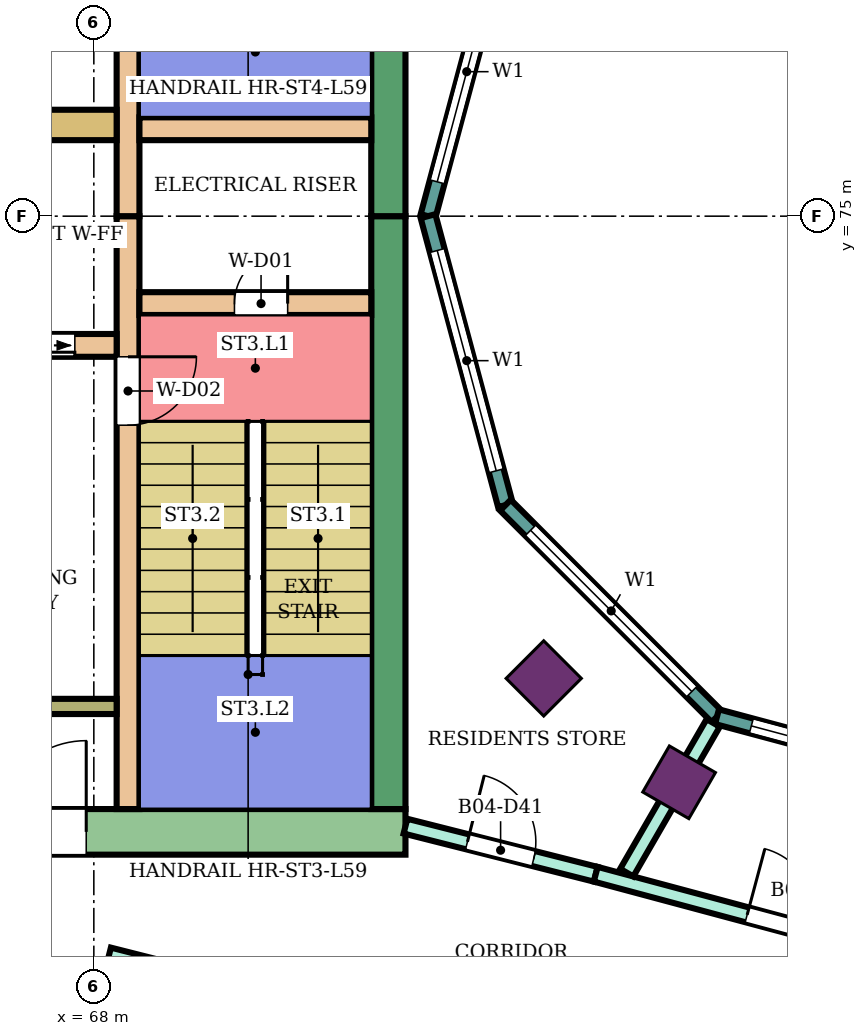
"""IFC4 building model, lengths in metres.
Left out: names, types, materials, properties, quantities, classifications, styles, units other than length and angle.
Written with IfcOpenShell. Run it as: python <this file> out.ifc"""

import sys

from ifc_helpers import new_model, si_unit, direction, frame, frame_2d, origin, origin_2d, place, context, subcontext, project, spatial, rectangle, extrude, element, fill, save


model = new_model("IFC4")
c1 = context("Model", 3, precision=1e-05, world=origin(), true_north=direction((0.0, 1.0)))
c2 = subcontext(c1, "Body", "Model", "MODEL_VIEW")
j1 = project(units=[si_unit("LENGTHUNIT", "METRE"), si_unit("PLANEANGLEUNIT", "RADIAN")], contexts=[c1])
p1 = place(None, origin())
s1 = spatial("IfcSite", under=j1, at=p1, CompositionType="ELEMENT")
p2 = place(p1, origin())
s2 = spatial("IfcBuilding", under=s1, at=p2, CompositionType="ELEMENT")
p3 = place(p2, frame((0.0, 0.0, 258.3)))
s3 = spatial("IfcBuildingStorey", under=s2, at=p3, CompositionType="ELEMENT", Elevation=258.3)
for number, where, z_axis, x_axis in (
    (1, (73.919, 68.919, 0.0), (0.0, 0.0, 1.0), (-0.707, -0.707, 0.0)),
    (2, (75.7, 67.552, 0.0), (0.0, 0.0, 1.0), (-0.5, -0.866, 0.0)),
):
    element("IfcColumn", number, at=place(p3, frame(where, z_axis=z_axis, x_axis=x_axis)), inside=s3, PredefinedType="COLUMN", context=c2, shape_type="SweptSolid", body=[
        extrude(rectangle(XDim=0.7, YDim=0.7, at=origin_2d()), origin(), (0.0, 0.0, 1.0), 4.2),
    ])
p4 = place(p3, frame((72.1, 66.9, 0.0), z_axis=(0.0, 0.0, 1.0), x_axis=(-1.0, 0.0, 0.0)))
e3 = element("IfcWall", 3, at=p4, inside=s3, PredefinedType="SHEAR", context=c2, shape_type="SweptSolid", body=[
    extrude(rectangle(XDim=14.9, YDim=0.6, at=frame_2d((7.45, 0.0))), origin(), (0.0, 0.0, 1.0), 3.88),
])
p5 = place(p4, frame((4.2, 0.0, 0.0)))
e4 = element("IfcOpeningElement", 4, at=p5, cuts=e3, PredefinedType="OPENING", context=c2, shape_type="SweptSolid", body=[
    extrude(rectangle(XDim=2.4, YDim=2.4, at=frame_2d((1.2, 1.2))), frame((0.0, 0.31, 0.0), z_axis=(0.0, -1.0, 0.0), x_axis=(1.0, 0.0, 0.0)), (0.0, 0.0, 1.0), 0.62),
])
for number, where, z_axis, x_axis in (
    (5, (71.875, 75.0, 0.0), (0.0, 0.0, 1.0), (0.0, -1.0, 0.0)),
    (6, (71.875, 82.8, 0.0), (0.0, 0.0, 1.0), (0.0, -1.0, 0.0)),
):
    element("IfcWall", number, at=place(p3, frame(where, z_axis=z_axis, x_axis=x_axis)), inside=s3, PredefinedType="SHEAR", context=c2, shape_type="SweptSolid", body=[
        extrude(rectangle(XDim=7.8, YDim=0.45, at=frame_2d((3.9, 0.0))), origin(), (0.0, 0.0, 1.0), 3.88),
    ])
p6 = place(p3, frame((68.45, 75.0, 0.0), z_axis=(0.0, 0.0, 1.0), x_axis=(0.0, -1.0, 0.0)))
e7 = element("IfcWall", 7, at=p6, inside=s3, PredefinedType="SHEAR", context=c2, shape_type="SweptSolid", body=[
    extrude(rectangle(XDim=7.8, YDim=0.3, at=frame_2d((3.9, 0.0))), origin(), (0.0, 0.0, 1.0), 3.88),
])
p7 = place(p6, frame((1.85, 0.0, 0.0)))
e8 = element("IfcOpeningElement", 8, at=p7, cuts=e7, PredefinedType="OPENING", context=c2, shape_type="SweptSolid", body=[
    extrude(rectangle(XDim=0.9, YDim=2.1, at=frame_2d((0.45, 1.05))), frame((0.0, 0.16, 0.0), z_axis=(0.0, -1.0, 0.0), x_axis=(1.0, 0.0, 0.0)), (0.0, 0.0, 1.0), 0.32),
])
p8 = place(p3, frame((68.45, 82.8, 0.0), z_axis=(0.0, 0.0, 1.0), x_axis=(0.0, -1.0, 0.0)))
e9 = element("IfcWall", 9, at=p8, inside=s3, PredefinedType="SHEAR", context=c2, shape_type="SweptSolid", body=[
    extrude(rectangle(XDim=7.8, YDim=0.3, at=frame_2d((3.9, 0.0))), origin(), (0.0, 0.0, 1.0), 3.88),
])
p9 = place(p8, frame((0.45, 0.0, 0.0)))
e10 = element("IfcOpeningElement", 10, at=p9, cuts=e9, PredefinedType="OPENING", context=c2, shape_type="SweptSolid", body=[
    extrude(rectangle(XDim=0.9, YDim=2.1, at=frame_2d((0.45, 1.05))), frame((0.0, 0.16, 0.0), z_axis=(0.0, -1.0, 0.0), x_axis=(1.0, 0.0, 0.0)), (0.0, 0.0, 1.0), 0.32),
])
p10 = place(p3, frame((71.65, 73.85, 0.0), z_axis=(0.0, 0.0, 1.0), x_axis=(-1.0, 0.0, 0.0)))
e11 = element("IfcWall", 11, at=p10, inside=s3, PredefinedType="SHEAR", context=c2, shape_type="SweptSolid", body=[
    extrude(rectangle(XDim=3.05, YDim=0.3, at=frame_2d((1.525, 0.0))), origin(), (0.0, 0.0, 1.0), 3.88),
])
p11 = place(p10, frame((1.1, 0.0, 0.0)))
e12 = element("IfcOpeningElement", 12, at=p11, cuts=e11, PredefinedType="OPENING", context=c2, shape_type="SweptSolid", body=[
    extrude(rectangle(XDim=0.7, YDim=2.0, at=frame_2d((0.35, 1.0))), frame((0.0, 0.16, 0.0), z_axis=(0.0, -1.0, 0.0), x_axis=(1.0, 0.0, 0.0)), (0.0, 0.0, 1.0), 0.32),
])
p12 = place(p3, frame((71.65, 76.15, 0.0), z_axis=(0.0, 0.0, 1.0), x_axis=(-1.0, 0.0, 0.0)))
e13 = element("IfcWall", 13, at=p12, inside=s3, PredefinedType="SHEAR", context=c2, shape_type="SweptSolid", body=[
    extrude(rectangle(XDim=3.05, YDim=0.3, at=frame_2d((1.525, 0.0))), origin(), (0.0, 0.0, 1.0), 3.88),
])
p13 = place(p3, frame((68.3, 73.3, 0.0), z_axis=(0.0, 0.0, 1.0), x_axis=(-1.0, 0.0, 0.0)))
e14 = element("IfcWall", 14, at=p13, inside=s3, PredefinedType="SHEAR", context=c2, shape_type="SweptSolid", body=[
    extrude(rectangle(XDim=11.1, YDim=0.3, at=frame_2d((5.55, 0.0))), origin(), (0.0, 0.0, 1.0), 3.88),
])
p14 = place(p13, frame((0.55, 0.0, 0.0)))
e15 = element("IfcOpeningElement", 15, at=p14, cuts=e14, PredefinedType="OPENING", context=c2, shape_type="SweptSolid", body=[
    extrude(rectangle(XDim=1.1, YDim=2.1, at=frame_2d((0.55, 1.05))), frame((0.0, 0.16, 0.0), z_axis=(0.0, -1.0, 0.0), x_axis=(1.0, 0.0, 0.0)), (0.0, 0.0, 1.0), 0.32),
])
p15 = place(p13, frame((3.0, 0.0, 0.0)))
e16 = element("IfcOpeningElement", 16, at=p15, cuts=e14, PredefinedType="OPENING", context=c2, shape_type="SweptSolid", body=[
    extrude(rectangle(XDim=1.2, YDim=2.1, at=frame_2d((0.6, 1.05))), frame((0.0, 0.16, 0.0), z_axis=(0.0, -1.0, 0.0), x_axis=(1.0, 0.0, 0.0)), (0.0, 0.0, 1.0), 0.32),
])
p16 = place(p13, frame((5.5, 0.0, 0.0)))
e17 = element("IfcOpeningElement", 17, at=p16, cuts=e14, PredefinedType="OPENING", context=c2, shape_type="SweptSolid", body=[
    extrude(rectangle(XDim=1.2, YDim=2.1, at=frame_2d((0.6, 1.05))), frame((0.0, 0.16, 0.0), z_axis=(0.0, -1.0, 0.0), x_axis=(1.0, 0.0, 0.0)), (0.0, 0.0, 1.0), 0.32),
])
p17 = place(p13, frame((7.77, 0.0, 0.0)))
e18 = element("IfcOpeningElement", 18, at=p17, cuts=e14, PredefinedType="OPENING", context=c2, shape_type="SweptSolid", body=[
    extrude(rectangle(XDim=0.9, YDim=2.1, at=frame_2d((0.45, 1.05))), frame((0.0, 0.16, 0.0), z_axis=(0.0, -1.0, 0.0), x_axis=(1.0, 0.0, 0.0)), (0.0, 0.0, 1.0), 0.32),
])
p18 = place(p13, frame((9.57, 0.0, 0.0)))
e19 = element("IfcOpeningElement", 19, at=p18, cuts=e14, PredefinedType="OPENING", context=c2, shape_type="SweptSolid", body=[
    extrude(rectangle(XDim=0.9, YDim=2.1, at=frame_2d((0.45, 1.05))), frame((0.0, 0.16, 0.0), z_axis=(0.0, -1.0, 0.0), x_axis=(1.0, 0.0, 0.0)), (0.0, 0.0, 1.0), 0.32),
])
p19 = place(p3, frame((68.3, 76.2, 0.0), z_axis=(0.0, 0.0, 1.0), x_axis=(-1.0, 0.0, 0.0)))
e20 = element("IfcWall", 20, at=p19, inside=s3, PredefinedType="SHEAR", context=c2, shape_type="SweptSolid", body=[
    extrude(rectangle(XDim=11.1, YDim=0.4, at=frame_2d((5.55, 0.0))), origin(), (0.0, 0.0, 1.0), 3.88),
])
p20 = place(p3, frame((68.3, 68.55, 0.0), z_axis=(0.0, 0.0, 1.0), x_axis=(-1.0, 0.0, 0.0)))
e21 = element("IfcWall", 21, at=p20, inside=s3, PredefinedType="SHEAR", context=c2, shape_type="SweptSolid", body=[
    extrude(rectangle(XDim=4.35, YDim=0.2, at=frame_2d((2.175, 0.0))), origin(), (0.0, 0.0, 1.0), 3.88),
])
p21 = place(p3, frame((73.415, 78.802, 0.0), z_axis=(0.0, 0.0, 1.0), x_axis=(-0.258789828301, -0.965933654434, 0.0)))
e22 = element("IfcWall", 22, at=p21, inside=s3, PredefinedType="NOTDEFINED", context=c2, shape_type="SweptSolid", body=[
    extrude(rectangle(XDim=3.936, YDim=0.2, at=frame_2d((1.968, 0.0))), origin(), (0.0, 0.0, 1.0), 4.2),
])
p22 = place(p21, frame((0.468, 0.0, 0.9)))
e23 = element("IfcOpeningElement", 23, at=p22, cuts=e22, PredefinedType="OPENING", context=c2, shape_type="SweptSolid", body=[
    extrude(rectangle(XDim=3.0, YDim=2.3, at=frame_2d((1.5, 1.15))), frame((0.0, 0.11, 0.0), z_axis=(0.0, -1.0, 0.0), x_axis=(1.0, 0.0, 0.0)), (0.0, 0.0, 1.0), 0.22),
])
p23 = place(p3, frame((72.396, 75.0, 0.0), z_axis=(0.0, 0.0, 1.0), x_axis=(0.258789828301, -0.965933654434, 0.0)))
e24 = element("IfcWall", 24, at=p23, inside=s3, PredefinedType="NOTDEFINED", context=c2, shape_type="SweptSolid", body=[
    extrude(rectangle(XDim=3.936, YDim=0.2, at=frame_2d((1.968, 0.0))), origin(), (0.0, 0.0, 1.0), 4.2),
])
p24 = place(p23, frame((0.468, 0.0, 0.9)))
e25 = element("IfcOpeningElement", 25, at=p24, cuts=e24, PredefinedType="OPENING", context=c2, shape_type="SweptSolid", body=[
    extrude(rectangle(XDim=3.0, YDim=2.3, at=frame_2d((1.5, 1.15))), frame((0.0, 0.11, 0.0), z_axis=(0.0, -1.0, 0.0), x_axis=(1.0, 0.0, 0.0)), (0.0, 0.0, 1.0), 0.22),
])
p25 = place(p3, frame((73.415, 71.198, 0.0), z_axis=(0.0, 0.0, 1.0), x_axis=(0.707106781187, -0.707106781187, 0.0)))
e26 = element("IfcWall", 26, at=p25, inside=s3, PredefinedType="NOTDEFINED", context=c2, shape_type="SweptSolid", body=[
    extrude(rectangle(XDim=3.936, YDim=0.2, at=frame_2d((1.968, 0.0))), origin(), (0.0, 0.0, 1.0), 4.2),
])
p26 = place(p25, frame((0.468, 0.0, 0.9)))
e27 = element("IfcOpeningElement", 27, at=p26, cuts=e26, PredefinedType="OPENING", context=c2, shape_type="SweptSolid", body=[
    extrude(rectangle(XDim=3.0, YDim=2.3, at=frame_2d((1.5, 1.15))), frame((0.0, 0.11, 0.0), z_axis=(0.0, -1.0, 0.0), x_axis=(1.0, 0.0, 0.0)), (0.0, 0.0, 1.0), 0.22),
])
p27 = place(p3, frame((76.198, 68.415, 0.0), z_axis=(0.0, 0.0, 1.0), x_axis=(0.965933654434, -0.258789828301, 0.0)))
e28 = element("IfcWall", 28, at=p27, inside=s3, PredefinedType="NOTDEFINED", context=c2, shape_type="SweptSolid", body=[
    extrude(rectangle(XDim=3.936, YDim=0.2, at=frame_2d((1.968, 0.0))), origin(), (0.0, 0.0, 1.0), 4.2),
])
p28 = place(p27, frame((0.468, 0.0, 0.9)))
e29 = element("IfcOpeningElement", 29, at=p28, cuts=e28, PredefinedType="OPENING", context=c2, shape_type="SweptSolid", body=[
    extrude(rectangle(XDim=3.0, YDim=2.3, at=frame_2d((1.5, 1.15))), frame((0.0, 0.11, 0.0), z_axis=(0.0, -1.0, 0.0), x_axis=(1.0, 0.0, 0.0)), (0.0, 0.0, 1.0), 0.22),
])
p29 = place(p3, frame((68.2, 65.28, 0.0), z_axis=(0.0, 0.0, 1.0), x_axis=(0.969450596516, -0.245286650503, 0.0)))
e30 = element("IfcWall", 30, at=p29, inside=s3, PredefinedType="PARTITIONING", context=c2, shape_type="SweptSolid", body=[
    extrude(rectangle(XDim=5.928, YDim=0.2, at=frame_2d((2.964, 0.0))), origin(), (0.0, 0.0, 1.0), 3.75),
])
p30 = place(p3, frame((72.1, 66.975, 0.0), z_axis=(0.0, 0.0, 1.0), x_axis=(0.969471314457, -0.245204752086, 0.0)))
e31 = element("IfcWall", 31, at=p30, inside=s3, PredefinedType="PARTITIONING", context=c2, shape_type="SweptSolid", body=[
    extrude(rectangle(XDim=2.582, YDim=0.2, at=frame_2d((1.291, 0.0))), origin(), (0.0, 0.0, 1.0), 3.75),
])
p31 = place(p30, frame((0.841, 0.0, 0.0)))
e32 = element("IfcOpeningElement", 32, at=p31, cuts=e31, PredefinedType="OPENING", context=c2, shape_type="SweptSolid", body=[
    extrude(rectangle(XDim=0.9, YDim=2.1, at=frame_2d((0.45, 1.05))), frame((0.0, 0.11, 0.0), z_axis=(0.0, -1.0, 0.0), x_axis=(1.0, 0.0, 0.0)), (0.0, 0.0, 1.0), 0.22),
])
p32 = place(p3, frame((74.603, 66.342, 0.0), z_axis=(0.0, 0.0, 1.0), x_axis=(0.965895298152, -0.258932950796, 0.0)))
e33 = element("IfcWall", 33, at=p32, inside=s3, PredefinedType="PARTITIONING", context=c2, shape_type="SweptSolid", body=[
    extrude(rectangle(XDim=5.538, YDim=0.2, at=frame_2d((2.769, 0.0))), origin(), (0.0, 0.0, 1.0), 3.75),
])
p33 = place(p32, frame((2.062, 0.0, 0.0)))
e34 = element("IfcOpeningElement", 34, at=p33, cuts=e33, PredefinedType="OPENING", context=c2, shape_type="SweptSolid", body=[
    extrude(rectangle(XDim=1.8, YDim=2.1, at=frame_2d((0.9, 1.05))), frame((0.0, 0.11, 0.0), z_axis=(0.0, -1.0, 0.0), x_axis=(1.0, 0.0, 0.0)), (0.0, 0.0, 1.0), 0.22),
])
p34 = place(p3, frame((75.011, 66.364, 0.0), z_axis=(0.0, 0.0, 1.0), x_axis=(0.500121996664, 0.86595495752, 0.0)))
e35 = element("IfcWall", 35, at=p34, inside=s3, PredefinedType="PARTITIONING", context=c2, shape_type="SweptSolid", body=[
    extrude(rectangle(XDim=2.274, YDim=0.2, at=frame_2d((1.137, 0.0))), origin(), (0.0, 0.0, 1.0), 3.75),
])
p35 = place(p22, origin())
e36 = element("IfcWindow", 36, at=p35, inside=s3, PartitioningType="SINGLE_PANEL", PredefinedType="WINDOW", context=c2, shape_type="SweptSolid", body=[
    extrude(rectangle(XDim=3.0, YDim=2.3, at=frame_2d((1.5, 1.15))), frame((0.0, 0.03, 0.0), z_axis=(0.0, -1.0, 0.0), x_axis=(1.0, 0.0, 0.0)), (0.0, 0.0, 1.0), 0.06),
])
fill(e23, e36)
p36 = place(p24, origin())
e37 = element("IfcWindow", 37, at=p36, inside=s3, PartitioningType="SINGLE_PANEL", PredefinedType="WINDOW", context=c2, shape_type="SweptSolid", body=[
    extrude(rectangle(XDim=3.0, YDim=2.3, at=frame_2d((1.5, 1.15))), frame((0.0, 0.03, 0.0), z_axis=(0.0, -1.0, 0.0), x_axis=(1.0, 0.0, 0.0)), (0.0, 0.0, 1.0), 0.06),
])
fill(e25, e37)
p37 = place(p26, origin())
e38 = element("IfcWindow", 38, at=p37, inside=s3, PartitioningType="SINGLE_PANEL", PredefinedType="WINDOW", context=c2, shape_type="SweptSolid", body=[
    extrude(rectangle(XDim=3.0, YDim=2.3, at=frame_2d((1.5, 1.15))), frame((0.0, 0.03, 0.0), z_axis=(0.0, -1.0, 0.0), x_axis=(1.0, 0.0, 0.0)), (0.0, 0.0, 1.0), 0.06),
])
fill(e27, e38)
p38 = place(p28, origin())
e39 = element("IfcWindow", 39, at=p38, inside=s3, PartitioningType="SINGLE_PANEL", PredefinedType="WINDOW", context=c2, shape_type="SweptSolid", body=[
    extrude(rectangle(XDim=3.0, YDim=2.3, at=frame_2d((1.5, 1.15))), frame((0.0, 0.03, 0.0), z_axis=(0.0, -1.0, 0.0), x_axis=(1.0, 0.0, 0.0)), (0.0, 0.0, 1.0), 0.06),
])
fill(e29, e39)
p39 = place(p33, origin())
e40 = element("IfcDoor", 40, at=p39, inside=s3, OperationType="DOUBLE_DOOR_SINGLE_SWING", PredefinedType="DOOR", context=c2, shape_type="SweptSolid", body=[
    extrude(rectangle(XDim=1.8, YDim=2.1, at=frame_2d((0.9, 1.05))), frame((0.0, 0.025, 0.0), z_axis=(0.0, -1.0, 0.0), x_axis=(1.0, 0.0, 0.0)), (0.0, 0.0, 1.0), 0.05),
])
fill(e34, e40)
p40 = place(p31, origin())
e41 = element("IfcDoor", 41, at=p40, inside=s3, OperationType="SINGLE_SWING_LEFT", PredefinedType="DOOR", context=c2, shape_type="SweptSolid", body=[
    extrude(rectangle(XDim=0.9, YDim=2.1, at=frame_2d((0.45, 1.05))), frame((0.0, 0.025, 0.0), z_axis=(0.0, -1.0, 0.0), x_axis=(1.0, 0.0, 0.0)), (0.0, 0.0, 1.0), 0.05),
])
fill(e32, e41)
p41 = place(p11, frame((0.7, 0.0, 0.0), z_axis=(0.0, 0.0, 1.0), x_axis=(-1.0, 0.0, 0.0)))
e42 = element("IfcDoor", 42, at=p41, inside=s3, OperationType="SINGLE_SWING_RIGHT", PredefinedType="DOOR", context=c2, shape_type="SweptSolid", body=[
    extrude(rectangle(XDim=0.7, YDim=2.0, at=frame_2d((0.35, 1.0))), frame((0.0, 0.025, 0.0), z_axis=(0.0, -1.0, 0.0), x_axis=(1.0, 0.0, 0.0)), (0.0, 0.0, 1.0), 0.05),
])
fill(e12, e42)
p42 = place(p7, origin())
e43 = element("IfcDoor", 43, at=p42, inside=s3, OperationType="SINGLE_SWING_LEFT", PredefinedType="DOOR", context=c2, shape_type="SweptSolid", body=[
    extrude(rectangle(XDim=0.9, YDim=2.1, at=frame_2d((0.45, 1.05))), frame((0.0, 0.025, 0.0), z_axis=(0.0, -1.0, 0.0), x_axis=(1.0, 0.0, 0.0)), (0.0, 0.0, 1.0), 0.05),
])
fill(e8, e43)
p43 = place(p14, origin())
e44 = element("IfcDoor", 44, at=p43, inside=s3, OperationType="DOUBLE_DOOR_SLIDING", PredefinedType="DOOR", context=c2, shape_type="SweptSolid", body=[
    extrude(rectangle(XDim=1.1, YDim=2.1, at=frame_2d((0.55, 1.05))), frame((0.0, 0.025, 0.0), z_axis=(0.0, -1.0, 0.0), x_axis=(1.0, 0.0, 0.0)), (0.0, 0.0, 1.0), 0.05),
])
fill(e15, e44)
p44 = place(p5, frame((2.4, 0.0, 0.0), z_axis=(0.0, 0.0, 1.0), x_axis=(-1.0, 0.0, 0.0)))
e45 = element("IfcDoor", 45, at=p44, inside=s3, OperationType="DOUBLE_DOOR_SINGLE_SWING", PredefinedType="DOOR", context=c2, shape_type="SweptSolid", body=[
    extrude(rectangle(XDim=2.4, YDim=2.4, at=frame_2d((1.2, 1.2))), frame((0.0, 0.025, 0.0), z_axis=(0.0, -1.0, 0.0), x_axis=(1.0, 0.0, 0.0)), (0.0, 0.0, 1.0), 0.05),
])
fill(e4, e45)
save(model, sys.argv[1])
